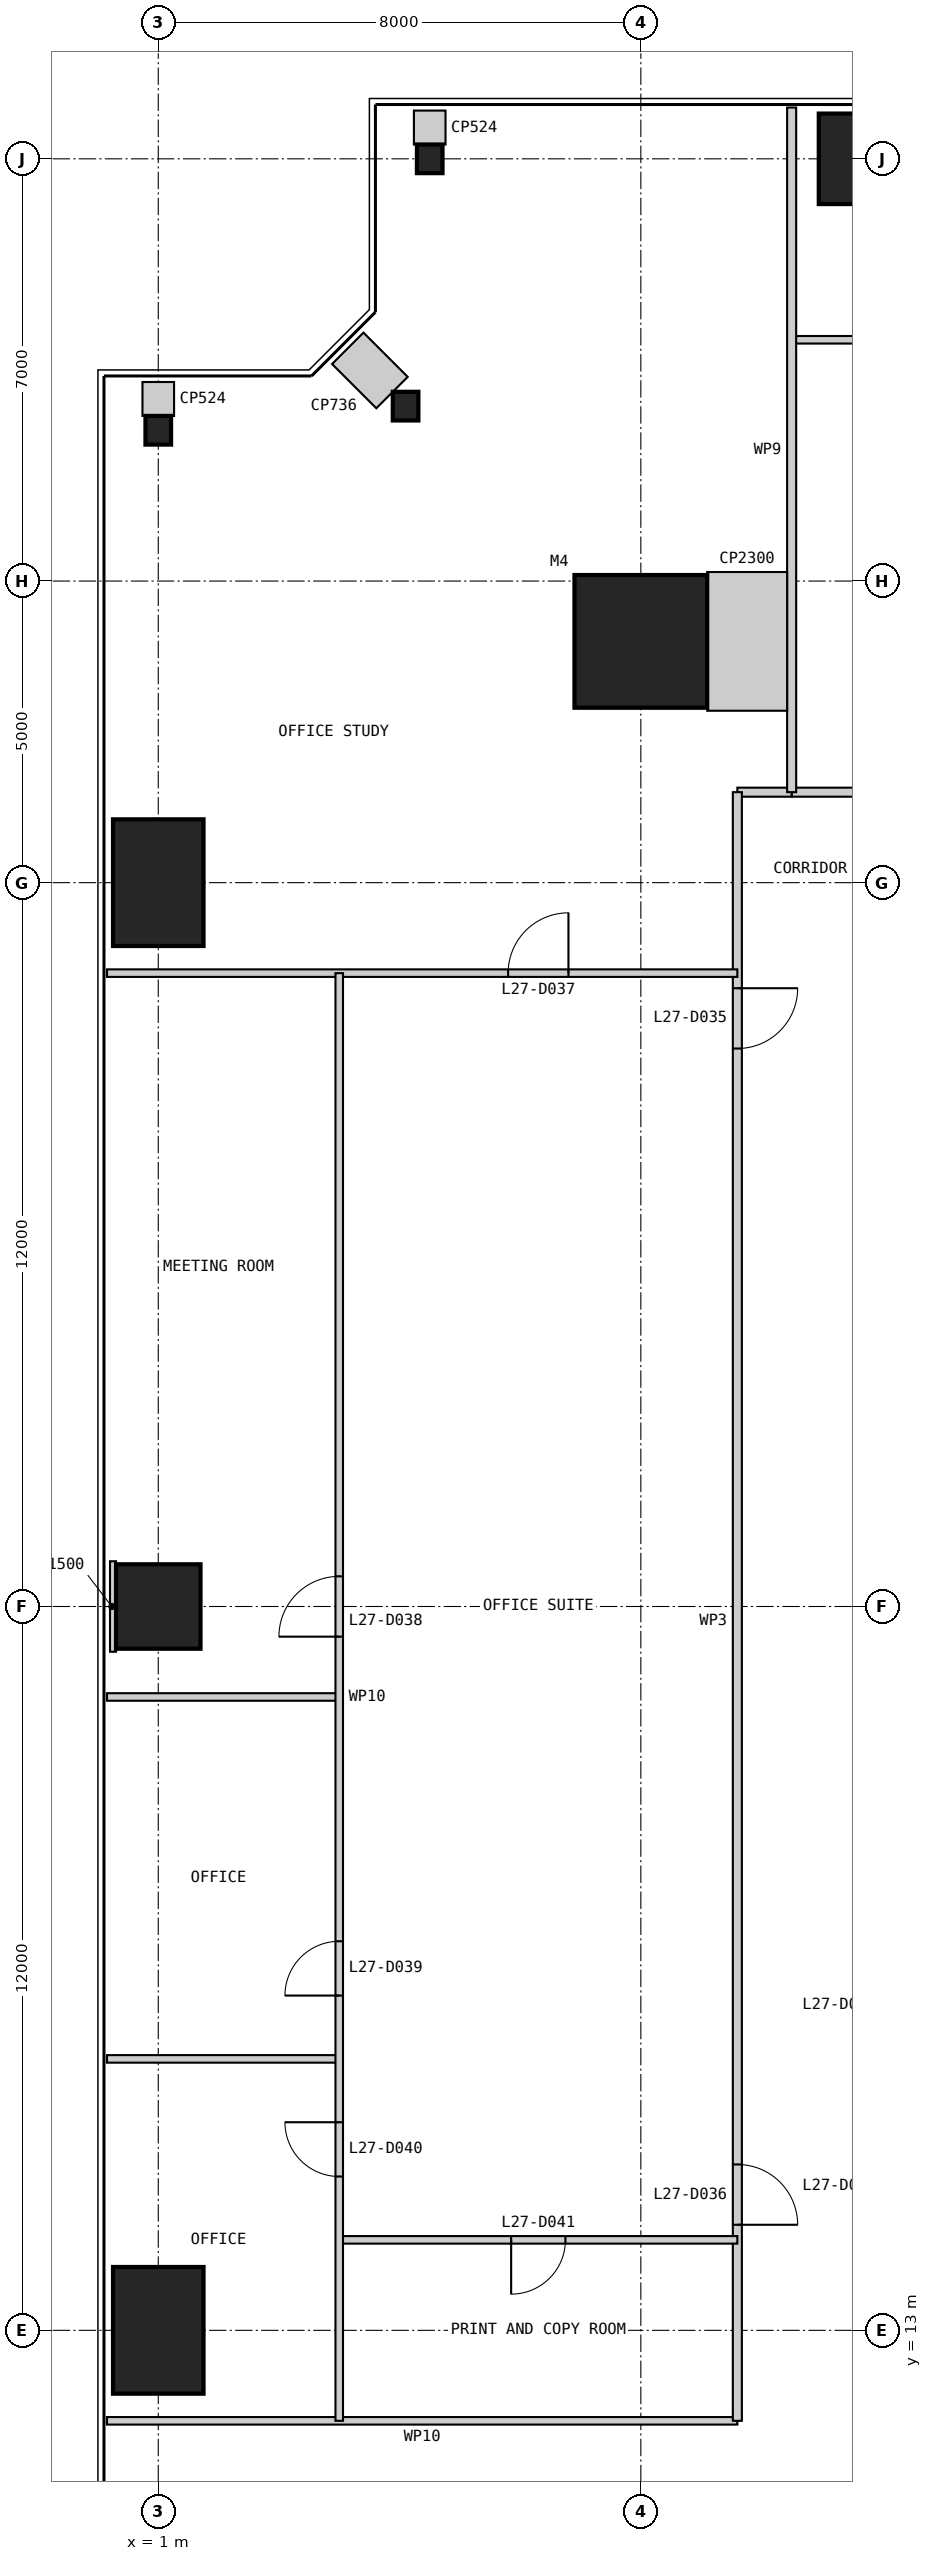
"""IFC4 building model, lengths in metres.
Left out: names, types, materials, properties, quantities, classifications, styles, units other than length and angle.
Written with IfcOpenShell. Run it as: python <this file> out.ifc"""

import sys

from ifc_helpers import new_model, si_unit, direction, frame, frame_2d, origin, origin_2d, place, context, subcontext, project, spatial, rectangle, i_section, extrude, element, fill, save


model = new_model("IFC4")
c1 = context("Model", 3, precision=1e-05, world=origin(), true_north=direction((0.0, 1.0)))
c2 = subcontext(c1, "Body", "Model", "MODEL_VIEW")
j1 = project(units=[si_unit("LENGTHUNIT", "METRE"), si_unit("PLANEANGLEUNIT", "RADIAN")], contexts=[c1])
p1 = place(None, origin())
s1 = spatial("IfcSite", under=j1, at=p1, CompositionType="ELEMENT")
p2 = place(p1, origin())
s2 = spatial("IfcBuilding", under=s1, at=p2, CompositionType="ELEMENT")
p3 = place(p2, frame((0.0, 0.0, 118.4)))
s3 = spatial("IfcBuildingStorey", under=s2, at=p3, CompositionType="ELEMENT", Elevation=118.4)
p4 = place(p3, frame((9.0, 41.0, 0.0), z_axis=(0.0, 0.0, 1.0), x_axis=(1.0, 0.0, 0.0)))
e1 = element("IfcColumn", 1, at=p4, inside=s3, PredefinedType="COLUMN", context=c2, shape_type="SweptSolid", body=[
    extrude(rectangle(XDim=2.2, YDim=2.2, at=origin_2d()), origin(), (0.0, 0.0, 1.0), 4.0),
])
p5 = place(p3, frame((13.0, 49.0, 0.0), z_axis=(0.0, 0.0, 1.0), x_axis=(1.0, 0.0, 0.0)))
e2 = element("IfcColumn", 2, at=p5, inside=s3, PredefinedType="COLUMN", context=c2, shape_type="SweptSolid", body=[
    extrude(rectangle(XDim=2.1, YDim=1.5, at=origin_2d()), origin(), (0.0, 0.0, 1.0), 4.0),
])
for number, where, z_axis, x_axis in (
    (3, (5.5, 49.0, 0.0), (0.0, 0.0, 1.0), (1.0, 0.0, 0.0)),
    (4, (5.1, 44.9, 0.0), (0.0, 0.0, 1.0), (1.0, 0.0, 0.0)),
    (5, (1.0, 44.5, 0.0), (0.0, 0.0, 1.0), (1.0, 0.0, 0.0)),
):
    element("IfcColumn", number, at=place(p3, frame(where, z_axis=z_axis, x_axis=x_axis)), inside=s3, PredefinedType="COLUMN", context=c2, shape_type="SweptSolid", body=[
        extrude(i_section(OverallWidth=0.424, OverallDepth=0.475, WebThickness=0.048, FlangeThickness=0.077, at=origin_2d()), origin(), (0.0, 0.0, 1.0), 4.0),
    ])
p6 = place(p3, frame((1.0, 37.0, 0.0), z_axis=(0.0, 0.0, 1.0), x_axis=(1.0, 0.0, 0.0)))
e6 = element("IfcColumn", 6, at=p6, inside=s3, PredefinedType="COLUMN", context=c2, shape_type="SweptSolid", body=[
    extrude(rectangle(XDim=1.5, YDim=2.1, at=origin_2d()), origin(), (0.0, 0.0, 1.0), 4.0),
])
p7 = place(p3, frame((1.0, 25.0, 0.0), z_axis=(0.0, 0.0, 1.0), x_axis=(1.0, 0.0, 0.0)))
e7 = element("IfcColumn", 7, at=p7, inside=s3, PredefinedType="COLUMN", context=c2, shape_type="SweptSolid", body=[
    extrude(rectangle(XDim=1.4, YDim=1.4, at=origin_2d()), origin(), (0.0, 0.0, 1.0), 4.0),
])
p8 = place(p3, frame((1.0, 13.0, 0.0), z_axis=(0.0, 0.0, 1.0), x_axis=(1.0, 0.0, 0.0)))
e8 = element("IfcColumn", 8, at=p8, inside=s3, PredefinedType="COLUMN", context=c2, shape_type="SweptSolid", body=[
    extrude(rectangle(XDim=1.5, YDim=2.1, at=origin_2d()), origin(), (0.0, 0.0, 1.0), 4.0),
])
p9 = place(p3, frame((0.15, 11.5, 0.0), z_axis=(0.0, 0.0, 1.0), x_axis=(1.0, 0.0, 0.0)))
e9 = element("IfcWall", 9, at=p9, inside=s3, PredefinedType="PARTITIONING", context=c2, shape_type="SweptSolid", body=[
    extrude(rectangle(XDim=10.45, YDim=0.125, at=frame_2d((5.225, 0.0))), origin(), (0.0, 0.0, 1.0), 3.85),
])
p10 = place(p3, frame((38.5, 38.5, 0.0), z_axis=(0.0, 0.0, 1.0), x_axis=(-1.0, 0.0, 0.0)))
e10 = element("IfcWall", 10, at=p10, inside=s3, PredefinedType="PARTITIONING", context=c2, shape_type="SweptSolid", body=[
    extrude(rectangle(XDim=27.0, YDim=0.15, at=frame_2d((13.5, 0.0))), origin(), (0.0, 0.0, 1.0), 3.85),
])
p11 = place(p10, frame((2.5, 0.0, 0.0)))
e11 = element("IfcOpeningElement", 11, at=p11, cuts=e10, PredefinedType="OPENING", context=c2, shape_type="SweptSolid", body=[
    extrude(rectangle(XDim=1.0, YDim=2.2, at=frame_2d((0.5, 1.1))), frame((0.0, 0.085, 0.0), z_axis=(0.0, -1.0, 0.0), x_axis=(1.0, 0.0, 0.0)), (0.0, 0.0, 1.0), 0.17),
])
p12 = place(p10, frame((16.0, 0.0, 0.0)))
e12 = element("IfcOpeningElement", 12, at=p12, cuts=e10, PredefinedType="OPENING", context=c2, shape_type="SweptSolid", body=[
    extrude(rectangle(XDim=1.0, YDim=2.2, at=frame_2d((0.5, 1.1))), frame((0.0, 0.085, 0.0), z_axis=(0.0, -1.0, 0.0), x_axis=(1.0, 0.0, 0.0)), (0.0, 0.0, 1.0), 0.17),
])
p13 = place(p3, frame((17.5, 46.0, 0.0), z_axis=(0.0, 0.0, 1.0), x_axis=(-1.0, 0.0, 0.0)))
e13 = element("IfcWall", 13, at=p13, inside=s3, PredefinedType="PARTITIONING", context=c2, shape_type="SweptSolid", body=[
    extrude(rectangle(XDim=6.0, YDim=0.125, at=frame_2d((3.0, 0.0))), origin(), (0.0, 0.0, 1.0), 3.85),
])
p14 = place(p3, frame((11.5, 38.5, 0.0), z_axis=(0.0, 0.0, 1.0), x_axis=(-1.0, 0.0, 0.0)))
e14 = element("IfcWall", 14, at=p14, inside=s3, PredefinedType="PARTITIONING", context=c2, shape_type="SweptSolid", body=[
    extrude(rectangle(XDim=0.9, YDim=0.15, at=frame_2d((0.45, 0.0))), origin(), (0.0, 0.0, 1.0), 3.85),
])
p15 = place(p3, frame((10.6, 38.5, 0.0), z_axis=(0.0, 0.0, 1.0), x_axis=(0.0, -1.0, 0.0)))
e15 = element("IfcWall", 15, at=p15, inside=s3, PredefinedType="PARTITIONING", context=c2, shape_type="SweptSolid", body=[
    extrude(rectangle(XDim=27.0, YDim=0.15, at=frame_2d((13.5, 0.0))), origin(), (0.0, 0.0, 1.0), 3.85),
])
p16 = place(p15, frame((3.25, 0.0, 0.0)))
e16 = element("IfcOpeningElement", 16, at=p16, cuts=e15, PredefinedType="OPENING", context=c2, shape_type="SweptSolid", body=[
    extrude(rectangle(XDim=1.0, YDim=2.2, at=frame_2d((0.5, 1.1))), frame((0.0, 0.085, 0.0), z_axis=(0.0, -1.0, 0.0), x_axis=(1.0, 0.0, 0.0)), (0.0, 0.0, 1.0), 0.17),
])
p17 = place(p15, frame((22.75, 0.0, 0.0)))
e17 = element("IfcOpeningElement", 17, at=p17, cuts=e15, PredefinedType="OPENING", context=c2, shape_type="SweptSolid", body=[
    extrude(rectangle(XDim=1.0, YDim=2.2, at=frame_2d((0.5, 1.1))), frame((0.0, 0.085, 0.0), z_axis=(0.0, -1.0, 0.0), x_axis=(1.0, 0.0, 0.0)), (0.0, 0.0, 1.0), 0.17),
])
p18 = place(p3, frame((11.5, 49.85, 0.0), z_axis=(0.0, 0.0, 1.0), x_axis=(0.0, -1.0, 0.0)))
e18 = element("IfcWall", 18, at=p18, inside=s3, PredefinedType="PARTITIONING", context=c2, shape_type="SweptSolid", body=[
    extrude(rectangle(XDim=11.35, YDim=0.15, at=frame_2d((5.675, 0.0))), origin(), (0.0, 0.0, 1.0), 3.85),
])
p19 = place(p3, frame((0.15, 35.5, 0.0), z_axis=(0.0, 0.0, 1.0), x_axis=(1.0, 0.0, 0.0)))
e19 = element("IfcWall", 19, at=p19, inside=s3, PredefinedType="PARTITIONING", context=c2, shape_type="SweptSolid", body=[
    extrude(rectangle(XDim=10.45, YDim=0.125, at=frame_2d((5.225, 0.0))), origin(), (0.0, 0.0, 1.0), 3.85),
])
p20 = place(p19, frame((6.65, 0.0, 0.0)))
e20 = element("IfcOpeningElement", 20, at=p20, cuts=e19, PredefinedType="OPENING", context=c2, shape_type="SweptSolid", body=[
    extrude(rectangle(XDim=1.0, YDim=2.2, at=frame_2d((0.5, 1.1))), frame((0.0, 0.073, 0.0), z_axis=(0.0, -1.0, 0.0), x_axis=(1.0, 0.0, 0.0)), (0.0, 0.0, 1.0), 0.145),
])
for number, where, z_axis, x_axis in (
    (21, (0.15, 23.5, 0.0), (0.0, 0.0, 1.0), (1.0, 0.0, 0.0)),
    (22, (0.15, 17.5, 0.0), (0.0, 0.0, 1.0), (1.0, 0.0, 0.0)),
):
    element("IfcWall", number, at=place(p3, frame(where, z_axis=z_axis, x_axis=x_axis)), inside=s3, PredefinedType="PARTITIONING", context=c2, shape_type="SweptSolid", body=[
        extrude(rectangle(XDim=3.85, YDim=0.125, at=frame_2d((1.925, 0.0))), origin(), (0.0, 0.0, 1.0), 3.85),
    ])
p21 = place(p3, frame((4.0, 14.5, 0.0), z_axis=(0.0, 0.0, 1.0), x_axis=(1.0, 0.0, 0.0)))
e23 = element("IfcWall", 23, at=p21, inside=s3, PredefinedType="PARTITIONING", context=c2, shape_type="SweptSolid", body=[
    extrude(rectangle(XDim=6.6, YDim=0.125, at=frame_2d((3.3, 0.0))), origin(), (0.0, 0.0, 1.0), 3.85),
])
p22 = place(p21, frame((2.85, 0.0, 0.0)))
e24 = element("IfcOpeningElement", 24, at=p22, cuts=e23, PredefinedType="OPENING", context=c2, shape_type="SweptSolid", body=[
    extrude(rectangle(XDim=0.9, YDim=2.2, at=frame_2d((0.45, 1.1))), frame((0.0, 0.073, 0.0), z_axis=(0.0, -1.0, 0.0), x_axis=(1.0, 0.0, 0.0)), (0.0, 0.0, 1.0), 0.145),
])
p23 = place(p3, frame((4.0, 35.5, 0.0), z_axis=(0.0, 0.0, 1.0), x_axis=(0.0, -1.0, 0.0)))
e25 = element("IfcWall", 25, at=p23, inside=s3, PredefinedType="PARTITIONING", context=c2, shape_type="SweptSolid", body=[
    extrude(rectangle(XDim=24.0, YDim=0.125, at=frame_2d((12.0, 0.0))), origin(), (0.0, 0.0, 1.0), 3.238),
])
p24 = place(p23, frame((10.0, 0.0, 0.0)))
e26 = element("IfcOpeningElement", 26, at=p24, cuts=e25, PredefinedType="OPENING", context=c2, shape_type="SweptSolid", body=[
    extrude(rectangle(XDim=1.0, YDim=2.2, at=frame_2d((0.5, 1.1))), frame((0.0, 0.073, 0.0), z_axis=(0.0, -1.0, 0.0), x_axis=(1.0, 0.0, 0.0)), (0.0, 0.0, 1.0), 0.145),
])
p25 = place(p23, frame((16.05, 0.0, 0.0)))
e27 = element("IfcOpeningElement", 27, at=p25, cuts=e25, PredefinedType="OPENING", context=c2, shape_type="SweptSolid", body=[
    extrude(rectangle(XDim=0.9, YDim=2.2, at=frame_2d((0.45, 1.1))), frame((0.0, 0.073, 0.0), z_axis=(0.0, -1.0, 0.0), x_axis=(1.0, 0.0, 0.0)), (0.0, 0.0, 1.0), 0.145),
])
p26 = place(p23, frame((19.05, 0.0, 0.0)))
e28 = element("IfcOpeningElement", 28, at=p26, cuts=e25, PredefinedType="OPENING", context=c2, shape_type="SweptSolid", body=[
    extrude(rectangle(XDim=0.9, YDim=2.2, at=frame_2d((0.45, 1.1))), frame((0.0, 0.073, 0.0), z_axis=(0.0, -1.0, 0.0), x_axis=(1.0, 0.0, 0.0)), (0.0, 0.0, 1.0), 0.145),
])
p27 = place(p3, frame((11.425, 41.0, 0.0), z_axis=(0.0, 0.0, 1.0), x_axis=(-1.0, 0.0, 0.0)))
e29 = element("IfcWall", 29, at=p27, inside=s3, PredefinedType="PARTITIONING", context=c2, shape_type="SweptSolid", body=[
    extrude(rectangle(XDim=1.325, YDim=2.3, at=frame_2d((0.663, 0.0))), origin(), (0.0, 0.0, 1.0), 3.85),
])
p28 = place(p3, frame((5.5, 49.8, 0.0), z_axis=(0.0, 0.0, 1.0), x_axis=(0.0, -1.0, 0.0)))
e30 = element("IfcWall", 30, at=p28, inside=s3, PredefinedType="PARTITIONING", context=c2, shape_type="SweptSolid", body=[
    extrude(rectangle(XDim=0.562, YDim=0.524, at=frame_2d((0.281, 0.0))), origin(), (0.0, 0.0, 1.0), 3.85),
])
p29 = place(p3, frame((4.141, 45.859, 0.0), z_axis=(0.0, 0.0, 1.0), x_axis=(0.707106781187, -0.707106781187, 0.0)))
e31 = element("IfcWall", 31, at=p29, inside=s3, PredefinedType="PARTITIONING", context=c2, shape_type="SweptSolid", body=[
    extrude(rectangle(XDim=1.038, YDim=0.736, at=frame_2d((0.519, 0.0))), origin(), (0.0, 0.0, 1.0), 3.85),
])
p30 = place(p3, frame((1.0, 45.3, 0.0), z_axis=(0.0, 0.0, 1.0), x_axis=(0.0, -1.0, 0.0)))
e32 = element("IfcWall", 32, at=p30, inside=s3, PredefinedType="PARTITIONING", context=c2, shape_type="SweptSolid", body=[
    extrude(rectangle(XDim=0.562, YDim=0.524, at=frame_2d((0.281, 0.0))), origin(), (0.0, 0.0, 1.0), 3.85),
])
p31 = place(p3, frame((0.2, 25.0, 0.0), z_axis=(0.0, 0.0, 1.0), x_axis=(1.0, 0.0, 0.0)))
e33 = element("IfcWall", 33, at=p31, inside=s3, PredefinedType="PARTITIONING", context=c2, shape_type="SweptSolid", body=[
    extrude(rectangle(XDim=0.1, YDim=1.5, at=frame_2d((0.05, 0.0))), origin(), (0.0, 0.0, 1.0), 3.85),
])
p32 = place(p16, origin())
e34 = element("IfcDoor", 34, at=p32, inside=s3, OperationType="SINGLE_SWING_LEFT", PredefinedType="DOOR", context=c2, shape_type="SweptSolid", body=[
    extrude(rectangle(XDim=1.0, YDim=2.2, at=frame_2d((0.5, 1.1))), frame((0.0, 0.025, 0.0), z_axis=(0.0, -1.0, 0.0), x_axis=(1.0, 0.0, 0.0)), (0.0, 0.0, 1.0), 0.05),
])
fill(e16, e34)
p33 = place(p17, origin())
e35 = element("IfcDoor", 35, at=p33, inside=s3, OperationType="SINGLE_SWING_RIGHT", PredefinedType="DOOR", context=c2, shape_type="SweptSolid", body=[
    extrude(rectangle(XDim=1.0, YDim=2.2, at=frame_2d((0.5, 1.1))), frame((0.0, 0.025, 0.0), z_axis=(0.0, -1.0, 0.0), x_axis=(1.0, 0.0, 0.0)), (0.0, 0.0, 1.0), 0.05),
])
fill(e17, e35)
p34 = place(p20, origin())
e36 = element("IfcDoor", 36, at=p34, inside=s3, OperationType="SINGLE_SWING_RIGHT", PredefinedType="DOOR", context=c2, shape_type="SweptSolid", body=[
    extrude(rectangle(XDim=1.0, YDim=2.2, at=frame_2d((0.5, 1.1))), frame((0.0, 0.025, 0.0), z_axis=(0.0, -1.0, 0.0), x_axis=(1.0, 0.0, 0.0)), (0.0, 0.0, 1.0), 0.05),
])
fill(e20, e36)
p35 = place(p24, frame((1.0, 0.0, 0.0), z_axis=(0.0, 0.0, 1.0), x_axis=(-1.0, 0.0, 0.0)))
e37 = element("IfcDoor", 37, at=p35, inside=s3, OperationType="SINGLE_SWING_LEFT", PredefinedType="DOOR", context=c2, shape_type="SweptSolid", body=[
    extrude(rectangle(XDim=1.0, YDim=2.2, at=frame_2d((0.5, 1.1))), frame((0.0, 0.025, 0.0), z_axis=(0.0, -1.0, 0.0), x_axis=(1.0, 0.0, 0.0)), (0.0, 0.0, 1.0), 0.05),
])
fill(e26, e37)
p36 = place(p25, frame((0.9, 0.0, 0.0), z_axis=(0.0, 0.0, 1.0), x_axis=(-1.0, 0.0, 0.0)))
e38 = element("IfcDoor", 38, at=p36, inside=s3, OperationType="SINGLE_SWING_LEFT", PredefinedType="DOOR", context=c2, shape_type="SweptSolid", body=[
    extrude(rectangle(XDim=0.9, YDim=2.2, at=frame_2d((0.45, 1.1))), frame((0.0, 0.025, 0.0), z_axis=(0.0, -1.0, 0.0), x_axis=(1.0, 0.0, 0.0)), (0.0, 0.0, 1.0), 0.05),
])
fill(e27, e38)
p37 = place(p26, frame((0.9, 0.0, 0.0), z_axis=(0.0, 0.0, 1.0), x_axis=(-1.0, 0.0, 0.0)))
e39 = element("IfcDoor", 39, at=p37, inside=s3, OperationType="SINGLE_SWING_RIGHT", PredefinedType="DOOR", context=c2, shape_type="SweptSolid", body=[
    extrude(rectangle(XDim=0.9, YDim=2.2, at=frame_2d((0.45, 1.1))), frame((0.0, 0.025, 0.0), z_axis=(0.0, -1.0, 0.0), x_axis=(1.0, 0.0, 0.0)), (0.0, 0.0, 1.0), 0.05),
])
fill(e28, e39)
p38 = place(p22, frame((0.9, 0.0, 0.0), z_axis=(0.0, 0.0, 1.0), x_axis=(-1.0, 0.0, 0.0)))
e40 = element("IfcDoor", 40, at=p38, inside=s3, OperationType="SINGLE_SWING_RIGHT", PredefinedType="DOOR", context=c2, shape_type="SweptSolid", body=[
    extrude(rectangle(XDim=0.9, YDim=2.2, at=frame_2d((0.45, 1.1))), frame((0.0, 0.025, 0.0), z_axis=(0.0, -1.0, 0.0), x_axis=(1.0, 0.0, 0.0)), (0.0, 0.0, 1.0), 0.05),
])
fill(e24, e40)
save(model, sys.argv[1])
